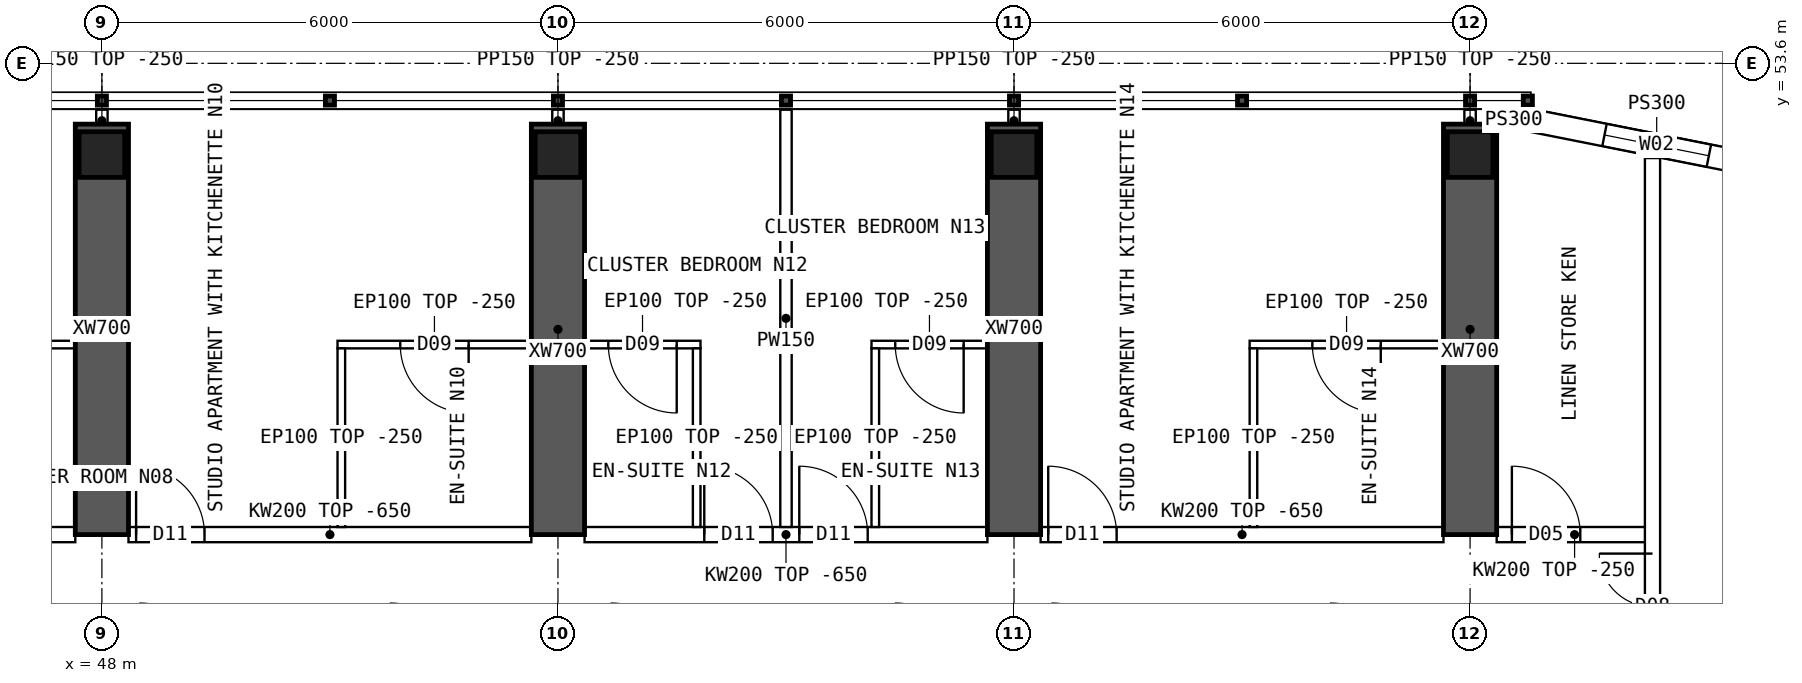
"""IFC4 building model, lengths in metres.
Left out: names, types, materials, properties, quantities, classifications, styles, units other than length and angle.
Written with IfcOpenShell. Run it as: python <this file> out.ifc"""

import sys

from ifc_helpers import new_model, si_unit, direction, frame, frame_2d, origin, origin_2d, place, context, subcontext, project, spatial, polyline, rectangle, hollow_rectangle, outline, extrude, element, fill, save


model = new_model("IFC4")
c1 = context("Model", 3, precision=1e-05, world=origin(), true_north=direction((0.0, 1.0)))
c2 = subcontext(c1, "Body", "Model", "MODEL_VIEW")
j1 = project(units=[si_unit("LENGTHUNIT", "METRE"), si_unit("PLANEANGLEUNIT", "RADIAN")], contexts=[c1])
p1 = place(None, origin())
s1 = spatial("IfcSite", under=j1, at=p1, CompositionType="ELEMENT")
p2 = place(p1, origin())
s2 = spatial("IfcBuilding", under=s1, at=p2, CompositionType="ELEMENT")
p3 = place(p2, frame((0.0, 0.0, 216.55)))
s3 = spatial("IfcBuildingStorey", under=s2, at=p3, CompositionType="ELEMENT", Elevation=216.55)
for number, where, z_axis, x_axis in (
    (1, (48.0, 52.4, 0.0), (0.0, 0.0, 1.0), (1.0, 0.0, 0.0)),
    (2, (54.0, 52.4, 0.0), (0.0, 0.0, 1.0), (1.0, 0.0, 0.0)),
    (3, (60.0, 52.4, 0.0), (0.0, 0.0, 1.0), (1.0, 0.0, 0.0)),
    (4, (66.0, 52.4, 0.0), (0.0, 0.0, 1.0), (1.0, 0.0, 0.0)),
):
    element("IfcColumn", number, at=place(p3, frame(where, z_axis=z_axis, x_axis=x_axis)), inside=s3, PredefinedType="COLUMN", context=c2, shape_type="SweptSolid", body=[
        extrude(hollow_rectangle(XDim=0.6, YDim=0.6, WallThickness=0.06, at=origin_2d()), origin(), (0.0, 0.0, 1.0), 3.75),
    ])
for number, where, z_axis, x_axis in (
    (5, (48.0, 47.4, 0.0), (0.0, 0.0, 1.0), (0.0, 1.0, 0.0)),
    (6, (54.0, 47.4, 0.0), (0.0, 0.0, 1.0), (0.0, 1.0, 0.0)),
    (7, (60.0, 47.4, 0.0), (0.0, 0.0, 1.0), (0.0, 1.0, 0.0)),
    (8, (66.0, 47.4, 0.0), (0.0, 0.0, 1.0), (0.0, 1.0, 0.0)),
):
    element("IfcWall", number, at=place(p3, frame(where, z_axis=z_axis, x_axis=x_axis)), inside=s3, PredefinedType="SHEAR", context=c2, shape_type="SweptSolid", body=[
        extrude(rectangle(XDim=5.4, YDim=0.7, at=frame_2d((2.7, 0.0))), origin(), (0.0, 0.0, 1.0), 3.75),
    ])
p4 = place(p3, frame((70.11, 52.192, 0.0), z_axis=(0.0, 0.0, 1.0), x_axis=(-0.98078325777, 0.195100490205, 0.0)))
e9 = element("IfcWall", 9, at=p4, inside=s3, PredefinedType="SOLIDWALL", context=c2, shape_type="SweptSolid", body=[
    extrude(outline(polyline([(-0.03, -0.15), (3.405, -0.15), (3.345, 0.15), (0.03, 0.15), (-0.03, -0.15)])), origin(), (0.0, 0.0, 1.0), 3.5),
])
p5 = place(p4, frame((0.988, 0.0, 0.9)))
e10 = element("IfcOpeningElement", 10, at=p5, cuts=e9, PredefinedType="OPENING", context=c2, shape_type="SweptSolid", body=[
    extrude(rectangle(XDim=1.4, YDim=1.8, at=frame_2d((0.7, 0.9))), frame((0.0, 0.16, 0.0), z_axis=(0.0, -1.0, 0.0), x_axis=(1.0, 0.0, 0.0)), (0.0, 0.0, 1.0), 0.32),
])
p6 = place(p3, frame((66.8, 52.85, 0.0), z_axis=(0.0, 0.0, 1.0), x_axis=(-1.0, 0.0, 0.0)))
e11 = element("IfcWall", 11, at=p6, inside=s3, PredefinedType="SOLIDWALL", context=c2, shape_type="SweptSolid", body=[
    extrude(rectangle(XDim=0.45, YDim=0.3, at=frame_2d((0.225, 0.0))), origin(), (0.0, 0.0, 1.0), 3.5),
])
p7 = place(p3, frame((42.35, 47.4, 0.0), z_axis=(0.0, 0.0, 1.0), x_axis=(1.0, 0.0, 0.0)))
e12 = element("IfcWall", 12, at=p7, inside=s3, PredefinedType="SOLIDWALL", context=c2, shape_type="SweptSolid", body=[
    extrude(outline(polyline([(0.0, 0.0), (5.3, 0.0), (5.3, 3.1), (0.0, 3.1), (0.0, 0.0)])), frame((0.0, 0.1, 0.0), z_axis=(0.0, -1.0, 0.0), x_axis=(1.0, 0.0, 0.0)), (0.0, 0.0, 1.0), 0.2),
])
p8 = place(p7, frame((2.3, 0.0, 0.0)))
e13 = element("IfcOpeningElement", 13, at=p8, cuts=e12, PredefinedType="OPENING", context=c2, shape_type="SweptSolid", body=[
    extrude(rectangle(XDim=0.9, YDim=2.1, at=frame_2d((0.45, 1.05))), frame((0.0, 0.11, 0.0), z_axis=(0.0, -1.0, 0.0), x_axis=(1.0, 0.0, 0.0)), (0.0, 0.0, 1.0), 0.22),
])
p9 = place(p3, frame((48.35, 47.4, 0.0), z_axis=(0.0, 0.0, 1.0), x_axis=(1.0, 0.0, 0.0)))
e14 = element("IfcWall", 14, at=p9, inside=s3, PredefinedType="SOLIDWALL", context=c2, shape_type="SweptSolid", body=[
    extrude(outline(polyline([(0.0, 0.0), (5.3, 0.0), (5.3, 3.1), (0.0, 3.1), (0.0, 0.0)])), frame((0.0, 0.1, 0.0), z_axis=(0.0, -1.0, 0.0), x_axis=(1.0, 0.0, 0.0)), (0.0, 0.0, 1.0), 0.2),
])
p10 = place(p9, frame((0.1, 0.0, 0.0)))
e15 = element("IfcOpeningElement", 15, at=p10, cuts=e14, PredefinedType="OPENING", context=c2, shape_type="SweptSolid", body=[
    extrude(rectangle(XDim=0.9, YDim=2.1, at=frame_2d((0.45, 1.05))), frame((0.0, 0.11, 0.0), z_axis=(0.0, -1.0, 0.0), x_axis=(1.0, 0.0, 0.0)), (0.0, 0.0, 1.0), 0.22),
])
p11 = place(p3, frame((54.35, 47.4, 0.0), z_axis=(0.0, 0.0, 1.0), x_axis=(1.0, 0.0, 0.0)))
e16 = element("IfcWall", 16, at=p11, inside=s3, PredefinedType="SOLIDWALL", context=c2, shape_type="SweptSolid", body=[
    extrude(outline(polyline([(0.0, 0.0), (5.3, 0.0), (5.3, 3.1), (0.0, 3.1), (0.0, 0.0)])), frame((0.0, 0.1, 0.0), z_axis=(0.0, -1.0, 0.0), x_axis=(1.0, 0.0, 0.0)), (0.0, 0.0, 1.0), 0.2),
])
p12 = place(p11, frame((1.575, 0.0, 0.0)))
e17 = element("IfcOpeningElement", 17, at=p12, cuts=e16, PredefinedType="OPENING", context=c2, shape_type="SweptSolid", body=[
    extrude(rectangle(XDim=0.9, YDim=2.1, at=frame_2d((0.45, 1.05))), frame((0.0, 0.11, 0.0), z_axis=(0.0, -1.0, 0.0), x_axis=(1.0, 0.0, 0.0)), (0.0, 0.0, 1.0), 0.22),
])
p13 = place(p11, frame((2.825, 0.0, 0.0)))
e18 = element("IfcOpeningElement", 18, at=p13, cuts=e16, PredefinedType="OPENING", context=c2, shape_type="SweptSolid", body=[
    extrude(rectangle(XDim=0.9, YDim=2.1, at=frame_2d((0.45, 1.05))), frame((0.0, 0.11, 0.0), z_axis=(0.0, -1.0, 0.0), x_axis=(1.0, 0.0, 0.0)), (0.0, 0.0, 1.0), 0.22),
])
p14 = place(p3, frame((60.35, 47.4, 0.0), z_axis=(0.0, 0.0, 1.0), x_axis=(1.0, 0.0, 0.0)))
e19 = element("IfcWall", 19, at=p14, inside=s3, PredefinedType="SOLIDWALL", context=c2, shape_type="SweptSolid", body=[
    extrude(outline(polyline([(0.0, 0.0), (5.3, 0.0), (5.3, 3.1), (0.0, 3.1), (0.0, 0.0)])), frame((0.0, 0.1, 0.0), z_axis=(0.0, -1.0, 0.0), x_axis=(1.0, 0.0, 0.0)), (0.0, 0.0, 1.0), 0.2),
])
p15 = place(p14, frame((0.1, 0.0, 0.0)))
e20 = element("IfcOpeningElement", 20, at=p15, cuts=e19, PredefinedType="OPENING", context=c2, shape_type="SweptSolid", body=[
    extrude(rectangle(XDim=0.9, YDim=2.1, at=frame_2d((0.45, 1.05))), frame((0.0, 0.11, 0.0), z_axis=(0.0, -1.0, 0.0), x_axis=(1.0, 0.0, 0.0)), (0.0, 0.0, 1.0), 0.22),
])
p16 = place(p3, frame((66.35, 47.4, 0.0), z_axis=(0.0, 0.0, 1.0), x_axis=(1.0, 0.0, 0.0)))
e21 = element("IfcWall", 21, at=p16, inside=s3, PredefinedType="SOLIDWALL", context=c2, shape_type="SweptSolid", body=[
    extrude(rectangle(XDim=2.05, YDim=0.2, at=frame_2d((1.025, 0.0))), origin(), (0.0, 0.0, 1.0), 3.5),
])
p17 = place(p16, frame((0.2, 0.0, 0.0)))
e22 = element("IfcOpeningElement", 22, at=p17, cuts=e21, PredefinedType="OPENING", context=c2, shape_type="SweptSolid", body=[
    extrude(rectangle(XDim=0.9, YDim=2.1, at=frame_2d((0.45, 1.05))), frame((0.0, 0.11, 0.0), z_axis=(0.0, -1.0, 0.0), x_axis=(1.0, 0.0, 0.0)), (0.0, 0.0, 1.0), 0.22),
])
p18 = place(p3, frame((44.5, 49.9, 0.0), z_axis=(0.0, 0.0, 1.0), x_axis=(1.0, 0.0, 0.0)))
e23 = element("IfcWall", 23, at=p18, inside=s3, PredefinedType="PARTITIONING", context=c2, shape_type="SweptSolid", body=[
    extrude(rectangle(XDim=3.15, YDim=0.1, at=frame_2d((1.575, 0.0))), origin(), (0.0, 0.0, 1.0), 3.5),
])
p19 = place(p18, frame((0.25, 0.0, 0.0)))
e24 = element("IfcOpeningElement", 24, at=p19, cuts=e23, PredefinedType="OPENING", context=c2, shape_type="SweptSolid", body=[
    extrude(rectangle(XDim=0.8, YDim=2.1, at=frame_2d((0.4, 1.05))), frame((0.0, 0.06, 0.0), z_axis=(0.0, -1.0, 0.0), x_axis=(1.0, 0.0, 0.0)), (0.0, 0.0, 1.0), 0.12),
])
p20 = place(p3, frame((51.1, 49.9, 0.0), z_axis=(0.0, 0.0, 1.0), x_axis=(1.0, 0.0, 0.0)))
e25 = element("IfcWall", 25, at=p20, inside=s3, PredefinedType="PARTITIONING", context=c2, shape_type="SweptSolid", body=[
    extrude(rectangle(XDim=2.55, YDim=0.1, at=frame_2d((1.275, 0.0))), origin(), (0.0, 0.0, 1.0), 3.5),
])
p21 = place(p20, frame((0.825, 0.0, 0.0)))
e26 = element("IfcOpeningElement", 26, at=p21, cuts=e25, PredefinedType="OPENING", context=c2, shape_type="SweptSolid", body=[
    extrude(rectangle(XDim=0.9, YDim=2.1, at=frame_2d((0.45, 1.05))), frame((0.0, 0.06, 0.0), z_axis=(0.0, -1.0, 0.0), x_axis=(1.0, 0.0, 0.0)), (0.0, 0.0, 1.0), 0.12),
])
p22 = place(p3, frame((51.15, 49.85, 0.0), z_axis=(0.0, 0.0, 1.0), x_axis=(0.0, -1.0, 0.0)))
e27 = element("IfcWall", 27, at=p22, inside=s3, PredefinedType="PARTITIONING", context=c2, shape_type="SweptSolid", body=[
    extrude(outline(polyline([(0.0, 0.0), (2.35, 0.0), (2.35, 3.1), (2.302, 3.1), (2.3, 3.5), (0.0, 3.5), (0.0, 0.0)])), frame((0.0, 0.05, 0.0), z_axis=(0.0, -1.0, 0.0), x_axis=(1.0, 0.0, 0.0)), (0.0, 0.0, 1.0), 0.1),
])
p23 = place(p3, frame((57.0, 52.99, 0.0), z_axis=(0.0, 0.0, 1.0), x_axis=(0.0, -1.0, 0.0)))
e28 = element("IfcWall", 28, at=p23, inside=s3, PredefinedType="PARTITIONING", context=c2, shape_type="SweptSolid", body=[
    extrude(outline(polyline([(0.0, 0.0), (5.49, 0.0), (5.49, 3.1), (5.442, 3.1), (5.44, 3.5), (0.792, 3.5), (0.79, 3.1), (0.392, 3.1), (0.39, 3.5), (0.0, 3.5), (0.0, 0.0)])), frame((0.0, 0.075, 0.0), z_axis=(0.0, -1.0, 0.0), x_axis=(1.0, 0.0, 0.0)), (0.0, 0.0, 1.0), 0.15),
])
p24 = place(p3, frame((54.35, 49.9, 0.0), z_axis=(0.0, 0.0, 1.0), x_axis=(1.0, 0.0, 0.0)))
e29 = element("IfcWall", 29, at=p24, inside=s3, PredefinedType="PARTITIONING", context=c2, shape_type="SweptSolid", body=[
    extrude(rectangle(XDim=1.525, YDim=0.1, at=frame_2d((0.762, 0.0))), origin(), (0.0, 0.0, 1.0), 3.5),
])
p25 = place(p24, frame((0.312, 0.0, 0.0)))
e30 = element("IfcOpeningElement", 30, at=p25, cuts=e29, PredefinedType="OPENING", context=c2, shape_type="SweptSolid", body=[
    extrude(rectangle(XDim=0.9, YDim=2.1, at=frame_2d((0.45, 1.05))), frame((0.0, 0.06, 0.0), z_axis=(0.0, -1.0, 0.0), x_axis=(1.0, 0.0, 0.0)), (0.0, 0.0, 1.0), 0.12),
])
p26 = place(p3, frame((55.825, 49.85, 0.0), z_axis=(0.0, 0.0, 1.0), x_axis=(0.0, -1.0, 0.0)))
e31 = element("IfcWall", 31, at=p26, inside=s3, PredefinedType="PARTITIONING", context=c2, shape_type="SweptSolid", body=[
    extrude(outline(polyline([(0.0, 0.0), (2.35, 0.0), (2.35, 3.1), (2.302, 3.1), (2.3, 3.5), (0.0, 3.5), (0.0, 0.0)])), frame((0.0, 0.05, 0.0), z_axis=(0.0, -1.0, 0.0), x_axis=(1.0, 0.0, 0.0)), (0.0, 0.0, 1.0), 0.1),
])
p27 = place(p3, frame((58.125, 49.9, 0.0), z_axis=(0.0, 0.0, 1.0), x_axis=(1.0, 0.0, 0.0)))
e32 = element("IfcWall", 32, at=p27, inside=s3, PredefinedType="PARTITIONING", context=c2, shape_type="SweptSolid", body=[
    extrude(rectangle(XDim=1.525, YDim=0.1, at=frame_2d((0.762, 0.0))), origin(), (0.0, 0.0, 1.0), 3.5),
])
p28 = place(p27, frame((0.312, 0.0, 0.0)))
e33 = element("IfcOpeningElement", 33, at=p28, cuts=e32, PredefinedType="OPENING", context=c2, shape_type="SweptSolid", body=[
    extrude(rectangle(XDim=0.9, YDim=2.1, at=frame_2d((0.45, 1.05))), frame((0.0, 0.06, 0.0), z_axis=(0.0, -1.0, 0.0), x_axis=(1.0, 0.0, 0.0)), (0.0, 0.0, 1.0), 0.12),
])
p29 = place(p3, frame((58.175, 49.85, 0.0), z_axis=(0.0, 0.0, 1.0), x_axis=(0.0, -1.0, 0.0)))
e34 = element("IfcWall", 34, at=p29, inside=s3, PredefinedType="PARTITIONING", context=c2, shape_type="SweptSolid", body=[
    extrude(outline(polyline([(0.0, 0.0), (2.35, 0.0), (2.35, 3.1), (2.302, 3.1), (2.3, 3.5), (0.0, 3.5), (0.0, 0.0)])), frame((0.0, 0.05, 0.0), z_axis=(0.0, -1.0, 0.0), x_axis=(1.0, 0.0, 0.0)), (0.0, 0.0, 1.0), 0.1),
])
p30 = place(p3, frame((63.1, 49.9, 0.0), z_axis=(0.0, 0.0, 1.0), x_axis=(1.0, 0.0, 0.0)))
e35 = element("IfcWall", 35, at=p30, inside=s3, PredefinedType="PARTITIONING", context=c2, shape_type="SweptSolid", body=[
    extrude(rectangle(XDim=2.55, YDim=0.1, at=frame_2d((1.275, 0.0))), origin(), (0.0, 0.0, 1.0), 3.5),
])
p31 = place(p30, frame((0.825, 0.0, 0.0)))
e36 = element("IfcOpeningElement", 36, at=p31, cuts=e35, PredefinedType="OPENING", context=c2, shape_type="SweptSolid", body=[
    extrude(rectangle(XDim=0.9, YDim=2.1, at=frame_2d((0.45, 1.05))), frame((0.0, 0.06, 0.0), z_axis=(0.0, -1.0, 0.0), x_axis=(1.0, 0.0, 0.0)), (0.0, 0.0, 1.0), 0.12),
])
p32 = place(p3, frame((63.15, 49.85, 0.0), z_axis=(0.0, 0.0, 1.0), x_axis=(0.0, -1.0, 0.0)))
e37 = element("IfcWall", 37, at=p32, inside=s3, PredefinedType="PARTITIONING", context=c2, shape_type="SweptSolid", body=[
    extrude(outline(polyline([(0.0, 0.0), (2.35, 0.0), (2.35, 3.1), (2.302, 3.1), (2.3, 3.5), (0.0, 3.5), (0.0, 0.0)])), frame((0.0, 0.05, 0.0), z_axis=(0.0, -1.0, 0.0), x_axis=(1.0, 0.0, 0.0)), (0.0, 0.0, 1.0), 0.1),
])
p33 = place(p3, frame((68.4, 11.646, 0.0), z_axis=(0.0, 0.0, 1.0), x_axis=(0.0, 1.0, 0.0)))
e38 = element("IfcWall", 38, at=p33, inside=s3, PredefinedType="SOLIDWALL", context=c2, shape_type="SweptSolid", body=[
    extrude(rectangle(XDim=40.708, YDim=0.2, at=frame_2d((20.354, 0.0))), origin(), (0.0, 0.0, 1.0), 3.5),
])
p34 = place(p33, frame((13.434, 0.0, 0.0)))
e39 = element("IfcOpeningElement", 39, at=p34, cuts=e38, PredefinedType="OPENING", context=c2, shape_type="SweptSolid", body=[
    extrude(rectangle(XDim=1.2, YDim=2.1, at=frame_2d((0.6, 1.05))), frame((0.0, 0.11, 0.0), z_axis=(0.0, -1.0, 0.0), x_axis=(1.0, 0.0, 0.0)), (0.0, 0.0, 1.0), 0.22),
])
p35 = place(p33, frame((26.074, 0.0, 0.0)))
e40 = element("IfcOpeningElement", 40, at=p35, cuts=e38, PredefinedType="OPENING", context=c2, shape_type="SweptSolid", body=[
    extrude(rectangle(XDim=1.2, YDim=2.1, at=frame_2d((0.6, 1.05))), frame((0.0, 0.11, 0.0), z_axis=(0.0, -1.0, 0.0), x_axis=(1.0, 0.0, 0.0)), (0.0, 0.0, 1.0), 0.22),
])
p36 = place(p33, frame((5.104, 0.0, 0.0)))
e41 = element("IfcOpeningElement", 41, at=p36, cuts=e38, PredefinedType="OPENING", context=c2, shape_type="SweptSolid", body=[
    extrude(rectangle(XDim=1.4, YDim=2.1, at=frame_2d((0.7, 1.05))), frame((0.0, 0.11, 0.0), z_axis=(0.0, -1.0, 0.0), x_axis=(1.0, 0.0, 0.0)), (0.0, 0.0, 1.0), 0.22),
])
p37 = place(p33, frame((34.104, 0.0, 0.0)))
e42 = element("IfcOpeningElement", 42, at=p37, cuts=e38, PredefinedType="OPENING", context=c2, shape_type="SweptSolid", body=[
    extrude(rectangle(XDim=1.4, YDim=2.1, at=frame_2d((0.7, 1.05))), frame((0.0, 0.11, 0.0), z_axis=(0.0, -1.0, 0.0), x_axis=(1.0, 0.0, 0.0)), (0.0, 0.0, 1.0), 0.22),
])
for number, where, z_axis, x_axis in (
    (43, (48.0, 52.7, 0.0), (0.0, 0.0, 1.0), (0.0, 1.0, 0.0)),
    (44, (54.0, 52.7, 0.0), (0.0, 0.0, 1.0), (0.0, 1.0, 0.0)),
    (45, (60.0, 52.7, 0.0), (0.0, 0.0, 1.0), (0.0, 1.0, 0.0)),
    (46, (66.0, 52.7, 0.0), (0.0, 0.0, 1.0), (0.0, 1.0, 0.0)),
):
    element("IfcWall", number, at=place(p3, frame(where, z_axis=z_axis, x_axis=x_axis)), inside=s3, PredefinedType="PARTITIONING", context=c2, shape_type="SweptSolid", body=[
        extrude(rectangle(XDim=0.29, YDim=0.15, at=frame_2d((0.145, 0.0))), origin(), (0.0, 0.0, 1.0), 3.5),
    ])
p38 = place(p5, origin())
e47 = element("IfcWindow", 47, at=p38, inside=s3, PartitioningType="SINGLE_PANEL", PredefinedType="WINDOW", context=c2, shape_type="SweptSolid", body=[
    extrude(rectangle(XDim=1.4, YDim=1.8, at=frame_2d((0.7, 0.9))), frame((0.0, 0.03, 0.0), z_axis=(0.0, -1.0, 0.0), x_axis=(1.0, 0.0, 0.0)), (0.0, 0.0, 1.0), 0.06),
])
fill(e10, e47)
p39 = place(p21, origin())
e48 = element("IfcDoor", 48, at=p39, inside=s3, OperationType="SINGLE_SWING_RIGHT", PredefinedType="DOOR", context=c2, shape_type="SweptSolid", body=[
    extrude(rectangle(XDim=0.9, YDim=2.1, at=frame_2d((0.45, 1.05))), frame((0.0, 0.025, 0.0), z_axis=(0.0, -1.0, 0.0), x_axis=(1.0, 0.0, 0.0)), (0.0, 0.0, 1.0), 0.05),
])
fill(e26, e48)
p40 = place(p10, origin())
e49 = element("IfcDoor", 49, at=p40, inside=s3, OperationType="SINGLE_SWING_LEFT", PredefinedType="DOOR", context=c2, shape_type="SweptSolid", body=[
    extrude(rectangle(XDim=0.9, YDim=2.1, at=frame_2d((0.45, 1.05))), frame((0.0, 0.025, 0.0), z_axis=(0.0, -1.0, 0.0), x_axis=(1.0, 0.0, 0.0)), (0.0, 0.0, 1.0), 0.05),
])
fill(e15, e49)
p41 = place(p25, origin())
e50 = element("IfcDoor", 50, at=p41, inside=s3, OperationType="SINGLE_SWING_RIGHT", PredefinedType="DOOR", context=c2, shape_type="SweptSolid", body=[
    extrude(rectangle(XDim=0.9, YDim=2.1, at=frame_2d((0.45, 1.05))), frame((0.0, 0.025, 0.0), z_axis=(0.0, -1.0, 0.0), x_axis=(1.0, 0.0, 0.0)), (0.0, 0.0, 1.0), 0.05),
])
fill(e30, e50)
p42 = place(p12, origin())
e51 = element("IfcDoor", 51, at=p42, inside=s3, OperationType="SINGLE_SWING_LEFT", PredefinedType="DOOR", context=c2, shape_type="SweptSolid", body=[
    extrude(rectangle(XDim=0.9, YDim=2.1, at=frame_2d((0.45, 1.05))), frame((0.0, 0.025, 0.0), z_axis=(0.0, -1.0, 0.0), x_axis=(1.0, 0.0, 0.0)), (0.0, 0.0, 1.0), 0.05),
])
fill(e17, e51)
p43 = place(p28, origin())
e52 = element("IfcDoor", 52, at=p43, inside=s3, OperationType="SINGLE_SWING_RIGHT", PredefinedType="DOOR", context=c2, shape_type="SweptSolid", body=[
    extrude(rectangle(XDim=0.9, YDim=2.1, at=frame_2d((0.45, 1.05))), frame((0.0, 0.025, 0.0), z_axis=(0.0, -1.0, 0.0), x_axis=(1.0, 0.0, 0.0)), (0.0, 0.0, 1.0), 0.05),
])
fill(e33, e52)
p44 = place(p13, origin())
e53 = element("IfcDoor", 53, at=p44, inside=s3, OperationType="SINGLE_SWING_LEFT", PredefinedType="DOOR", context=c2, shape_type="SweptSolid", body=[
    extrude(rectangle(XDim=0.9, YDim=2.1, at=frame_2d((0.45, 1.05))), frame((0.0, 0.025, 0.0), z_axis=(0.0, -1.0, 0.0), x_axis=(1.0, 0.0, 0.0)), (0.0, 0.0, 1.0), 0.05),
])
fill(e18, e53)
p45 = place(p31, origin())
e54 = element("IfcDoor", 54, at=p45, inside=s3, OperationType="SINGLE_SWING_RIGHT", PredefinedType="DOOR", context=c2, shape_type="SweptSolid", body=[
    extrude(rectangle(XDim=0.9, YDim=2.1, at=frame_2d((0.45, 1.05))), frame((0.0, 0.025, 0.0), z_axis=(0.0, -1.0, 0.0), x_axis=(1.0, 0.0, 0.0)), (0.0, 0.0, 1.0), 0.05),
])
fill(e36, e54)
p46 = place(p15, origin())
e55 = element("IfcDoor", 55, at=p46, inside=s3, OperationType="SINGLE_SWING_LEFT", PredefinedType="DOOR", context=c2, shape_type="SweptSolid", body=[
    extrude(rectangle(XDim=0.9, YDim=2.1, at=frame_2d((0.45, 1.05))), frame((0.0, 0.025, 0.0), z_axis=(0.0, -1.0, 0.0), x_axis=(1.0, 0.0, 0.0)), (0.0, 0.0, 1.0), 0.05),
])
fill(e20, e55)
p47 = place(p37, origin())
e56 = element("IfcDoor", 56, at=p47, inside=s3, OperationType="DOUBLE_DOOR_SINGLE_SWING", PredefinedType="DOOR", context=c2, shape_type="SweptSolid", body=[
    extrude(rectangle(XDim=1.4, YDim=2.1, at=frame_2d((0.7, 1.05))), frame((0.0, 0.025, 0.0), z_axis=(0.0, -1.0, 0.0), x_axis=(1.0, 0.0, 0.0)), (0.0, 0.0, 1.0), 0.05),
])
fill(e42, e56)
p48 = place(p17, origin())
e57 = element("IfcDoor", 57, at=p48, inside=s3, OperationType="SINGLE_SWING_LEFT", PredefinedType="DOOR", context=c2, shape_type="SweptSolid", body=[
    extrude(rectangle(XDim=0.9, YDim=2.1, at=frame_2d((0.45, 1.05))), frame((0.0, 0.025, 0.0), z_axis=(0.0, -1.0, 0.0), x_axis=(1.0, 0.0, 0.0)), (0.0, 0.0, 1.0), 0.05),
])
fill(e22, e57)
save(model, sys.argv[1])
